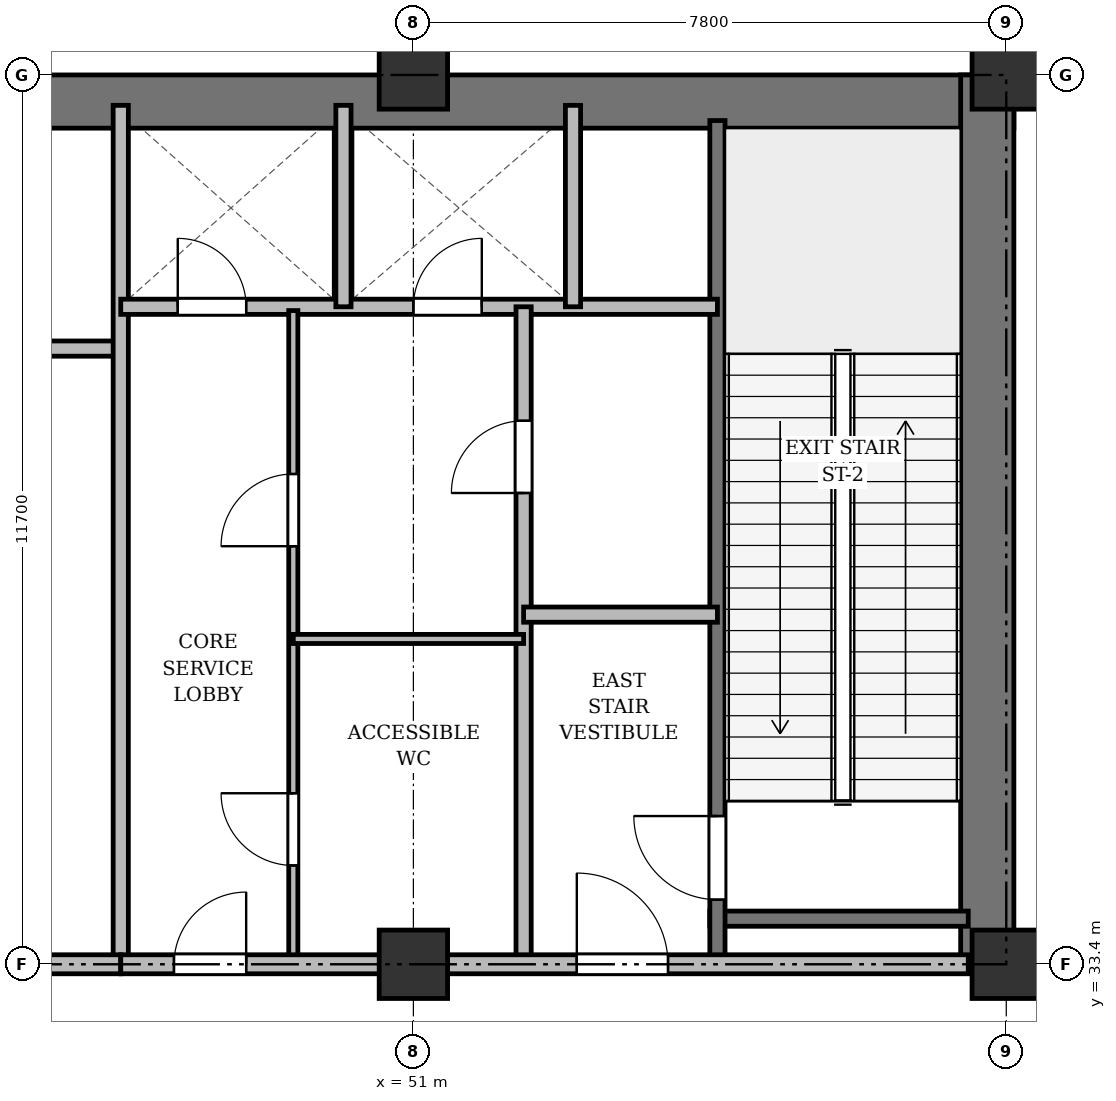
"""IFC4 building model, lengths in metres.
Left out: names, types, materials, properties, quantities, classifications, styles, units other than length and angle.
Written with IfcOpenShell. Run it as: python <this file> out.ifc"""

import sys

from ifc_helpers import new_model, si_unit, direction, frame, frame_2d, origin, origin_2d, place, context, subcontext, project, spatial, rectangle, extrude, source, transform, mapped, element, fill, save


model = new_model("IFC4")
c1 = context("Model", 3, precision=1e-05, world=origin(), true_north=direction((0.0, 1.0)))
c2 = subcontext(c1, "Body", "Model", "MODEL_VIEW")
j1 = project(units=[si_unit("LENGTHUNIT", "METRE"), si_unit("PLANEANGLEUNIT", "RADIAN")], contexts=[c1])
p1 = place(None, origin())
s1 = spatial("IfcSite", under=j1, at=p1, CompositionType="ELEMENT")
p2 = place(p1, origin())
s2 = spatial("IfcBuilding", under=s1, at=p2, CompositionType="ELEMENT")
p3 = place(p2, frame((0.0, 0.0, 73.9)))
s3 = spatial("IfcBuildingStorey", under=s2, at=p3, CompositionType="ELEMENT", Elevation=73.9)
m1 = source(origin(), c2, "Body", "SweptSolid", [
    extrude(rectangle(XDim=0.9, YDim=0.9, at=origin_2d()), origin(), (0.0, 0.0, 1.0), 7.8),
])
for number, where, z_axis, x_axis in (
    (1, (51.0, 33.4, 0.0), (0.0, 0.0, 1.0), (1.0, 0.0, 0.0)),
    (2, (51.0, 45.1, 0.0), (0.0, 0.0, 1.0), (1.0, 0.0, 0.0)),
    (3, (58.8, 33.4, 0.0), (0.0, 0.0, 1.0), (1.0, 0.0, 0.0)),
    (4, (58.8, 45.1, 0.0), (0.0, 0.0, 1.0), (1.0, 0.0, 0.0)),
):
    element("IfcColumn", number, at=place(p3, frame(where, z_axis=z_axis, x_axis=x_axis)), inside=s3, PredefinedType="COLUMN", context=c2, shape_type="MappedRepresentation", body=[
        mapped(m1, transform((0.0, 0.0, 0.0), x_axis=(1.0, 0.0, 0.0), y_axis=(0.0, 1.0, 0.0), z_axis=(0.0, 0.0, 1.0), scale=1.0)),
    ])
p4 = place(p3, frame((15.5, 44.75, 0.0), z_axis=(0.0, 0.0, 1.0), x_axis=(1.0, 0.0, 0.0)))
e5 = element("IfcWall", 5, at=p4, inside=s3, PredefinedType="SHEAR", context=c2, shape_type="SweptSolid", body=[
    extrude(rectangle(XDim=43.4, YDim=0.7, at=frame_2d((21.7, 0.0))), origin(), (0.0, 0.0, 1.0), 7.42),
])
p5 = place(p3, frame((58.55, 33.4, 0.0), z_axis=(0.0, 0.0, 1.0), x_axis=(0.0, 1.0, 0.0)))
e6 = element("IfcWall", 6, at=p5, inside=s3, PredefinedType="SHEAR", context=c2, shape_type="SweptSolid", body=[
    extrude(rectangle(XDim=11.7, YDim=0.7, at=frame_2d((5.85, 0.0))), origin(), (0.0, 0.0, 1.0), 7.42),
])
p6 = place(p3, frame((54.9, 34.0, 0.0), z_axis=(0.0, 0.0, 1.0), x_axis=(1.0, 0.0, 0.0)))
e7 = element("IfcWall", 7, at=p6, inside=s3, PredefinedType="SHEAR", context=c2, shape_type="SweptSolid", body=[
    extrude(rectangle(XDim=3.4, YDim=0.2, at=frame_2d((1.7, 0.0))), origin(), (0.0, 0.0, 1.0), 7.42),
])
p7 = place(p3, frame((55.0, 33.4, 0.0), z_axis=(0.0, 0.0, 1.0), x_axis=(0.0, 1.0, 0.0)))
e8 = element("IfcWall", 8, at=p7, inside=s3, PredefinedType="SHEAR", context=c2, shape_type="SweptSolid", body=[
    extrude(rectangle(XDim=11.1, YDim=0.2, at=frame_2d((5.55, 0.0))), origin(), (0.0, 0.0, 1.0), 7.42),
])
p8 = place(p7, frame((0.85, 0.0, 0.0)))
e9 = element("IfcOpeningElement", 9, at=p8, cuts=e8, PredefinedType="OPENING", context=c2, shape_type="SweptSolid", body=[
    extrude(rectangle(XDim=1.1, YDim=2.15, at=frame_2d((0.55, 1.075))), frame((0.0, 0.11, 0.0), z_axis=(0.0, -1.0, 0.0), x_axis=(1.0, 0.0, 0.0)), (0.0, 0.0, 1.0), 0.22),
])
p9 = place(p3, frame((40.25, 41.5, 0.0), z_axis=(0.0, 0.0, 1.0), x_axis=(1.0, 0.0, 0.0)))
e10 = element("IfcWall", 10, at=p9, inside=s3, PredefinedType="SOLIDWALL", context=c2, shape_type="SweptSolid", body=[
    extrude(rectangle(XDim=6.9, YDim=0.2, at=frame_2d((3.45, 0.0))), origin(), (0.0, 0.0, 1.0), 6.832),
])
p10 = place(p3, frame((47.15, 33.4, 0.0), z_axis=(0.0, 0.0, 1.0), x_axis=(0.0, 1.0, 0.0)))
e11 = element("IfcWall", 11, at=p10, inside=s3, PredefinedType="SOLIDWALL", context=c2, shape_type="SweptSolid", body=[
    extrude(rectangle(XDim=11.3, YDim=0.2, at=frame_2d((5.65, 0.0))), origin(), (0.0, 0.0, 1.0), 6.77),
])
p11 = place(p3, frame((26.3, 33.4, 0.0), z_axis=(0.0, 0.0, 1.0), x_axis=(1.0, 0.0, 0.0)))
e12 = element("IfcWall", 12, at=p11, inside=s3, PredefinedType="PARTITIONING", context=c2, shape_type="SweptSolid", body=[
    extrude(rectangle(XDim=20.85, YDim=0.25, at=frame_2d((10.425, 0.0))), origin(), (0.0, 0.0, 1.0), 6.77),
])
p12 = place(p11, frame((9.2, 0.0, 0.0)))
e13 = element("IfcOpeningElement", 13, at=p12, cuts=e12, PredefinedType="OPENING", context=c2, shape_type="SweptSolid", body=[
    extrude(rectangle(XDim=1.6, YDim=2.2, at=frame_2d((0.8, 1.1))), frame((0.0, 0.135, 0.0), z_axis=(0.0, -1.0, 0.0), x_axis=(1.0, 0.0, 0.0)), (0.0, 0.0, 1.0), 0.27),
])
p13 = place(p3, frame((47.15, 42.05, 0.0), z_axis=(0.0, 0.0, 1.0), x_axis=(1.0, 0.0, 0.0)))
e14 = element("IfcWall", 14, at=p13, inside=s3, PredefinedType="SOLIDWALL", context=c2, shape_type="SweptSolid", body=[
    extrude(rectangle(XDim=7.85, YDim=0.2, at=frame_2d((3.925, 0.0))), origin(), (0.0, 0.0, 1.0), 6.832),
])
p14 = place(p13, frame((0.75, 0.0, 0.0)))
e15 = element("IfcOpeningElement", 15, at=p14, cuts=e14, PredefinedType="OPENING", context=c2, shape_type="SweptSolid", body=[
    extrude(rectangle(XDim=0.9, YDim=2.1, at=frame_2d((0.45, 1.05))), frame((0.0, 0.11, 0.0), z_axis=(0.0, -1.0, 0.0), x_axis=(1.0, 0.0, 0.0)), (0.0, 0.0, 1.0), 0.22),
])
p15 = place(p13, frame((3.85, 0.0, 0.0)))
e16 = element("IfcOpeningElement", 16, at=p15, cuts=e14, PredefinedType="OPENING", context=c2, shape_type="SweptSolid", body=[
    extrude(rectangle(XDim=0.9, YDim=2.1, at=frame_2d((0.45, 1.05))), frame((0.0, 0.11, 0.0), z_axis=(0.0, -1.0, 0.0), x_axis=(1.0, 0.0, 0.0)), (0.0, 0.0, 1.0), 0.22),
])
for number, where, z_axis, x_axis in (
    (17, (50.08, 42.05, 0.0), (0.0, 0.0, 1.0), (0.0, 1.0, 0.0)),
    (18, (53.1, 42.05, 0.0), (0.0, 0.0, 1.0), (0.0, 1.0, 0.0)),
):
    element("IfcWall", number, at=place(p3, frame(where, z_axis=z_axis, x_axis=x_axis)), inside=s3, PredefinedType="SOLIDWALL", context=c2, shape_type="SweptSolid", body=[
        extrude(rectangle(XDim=2.65, YDim=0.2, at=frame_2d((1.325, 0.0))), origin(), (0.0, 0.0, 1.0), 7.42),
    ])
p16 = place(p3, frame((52.45, 33.4, 0.0), z_axis=(0.0, 0.0, 1.0), x_axis=(0.0, 1.0, 0.0)))
e19 = element("IfcWall", 19, at=p16, inside=s3, PredefinedType="PARTITIONING", context=c2, shape_type="SweptSolid", body=[
    extrude(rectangle(XDim=8.65, YDim=0.2, at=frame_2d((4.325, 0.0))), origin(), (0.0, 0.0, 1.0), 6.77),
])
p17 = place(p16, frame((6.2, 0.0, 0.0)))
e20 = element("IfcOpeningElement", 20, at=p17, cuts=e19, PredefinedType="OPENING", context=c2, shape_type="SweptSolid", body=[
    extrude(rectangle(XDim=0.95, YDim=2.15, at=frame_2d((0.475, 1.075))), frame((0.0, 0.11, 0.0), z_axis=(0.0, -1.0, 0.0), x_axis=(1.0, 0.0, 0.0)), (0.0, 0.0, 1.0), 0.22),
])
p18 = place(p3, frame((52.45, 38.0, 0.0), z_axis=(0.0, 0.0, 1.0), x_axis=(1.0, 0.0, 0.0)))
e21 = element("IfcWall", 21, at=p18, inside=s3, PredefinedType="PARTITIONING", context=c2, shape_type="SweptSolid", body=[
    extrude(rectangle(XDim=2.55, YDim=0.2, at=frame_2d((1.275, 0.0))), origin(), (0.0, 0.0, 1.0), 7.42),
])
p19 = place(p3, frame((49.42, 33.4, 0.0), z_axis=(0.0, 0.0, 1.0), x_axis=(0.0, 1.0, 0.0)))
e22 = element("IfcWall", 22, at=p19, inside=s3, PredefinedType="PARTITIONING", context=c2, shape_type="SweptSolid", body=[
    extrude(rectangle(XDim=8.6, YDim=0.12, at=frame_2d((4.3, 0.0))), origin(), (0.0, 0.0, 1.0), 6.77),
])
p20 = place(p19, frame((1.3, 0.0, 0.0)))
e23 = element("IfcOpeningElement", 23, at=p20, cuts=e22, PredefinedType="OPENING", context=c2, shape_type="SweptSolid", body=[
    extrude(rectangle(XDim=0.95, YDim=2.15, at=frame_2d((0.475, 1.075))), frame((0.0, 0.07, 0.0), z_axis=(0.0, -1.0, 0.0), x_axis=(1.0, 0.0, 0.0)), (0.0, 0.0, 1.0), 0.14),
])
p21 = place(p19, frame((5.5, 0.0, 0.0)))
e24 = element("IfcOpeningElement", 24, at=p21, cuts=e22, PredefinedType="OPENING", context=c2, shape_type="SweptSolid", body=[
    extrude(rectangle(XDim=0.95, YDim=2.15, at=frame_2d((0.475, 1.075))), frame((0.0, 0.07, 0.0), z_axis=(0.0, -1.0, 0.0), x_axis=(1.0, 0.0, 0.0)), (0.0, 0.0, 1.0), 0.14),
])
p22 = place(p3, frame((49.42, 37.68, 0.0), z_axis=(0.0, 0.0, 1.0), x_axis=(1.0, 0.0, 0.0)))
e25 = element("IfcWall", 25, at=p22, inside=s3, PredefinedType="PARTITIONING", context=c2, shape_type="SweptSolid", body=[
    extrude(rectangle(XDim=3.03, YDim=0.12, at=frame_2d((1.515, 0.0))), origin(), (0.0, 0.0, 1.0), 6.832),
])
p23 = place(p3, frame((47.15, 33.4, 0.0), z_axis=(0.0, 0.0, 1.0), x_axis=(1.0, 0.0, 0.0)))
e26 = element("IfcWall", 26, at=p23, inside=s3, PredefinedType="PARTITIONING", context=c2, shape_type="SweptSolid", body=[
    extrude(rectangle(XDim=11.15, YDim=0.25, at=frame_2d((5.575, 0.0))), origin(), (0.0, 0.0, 1.0), 6.77),
])
p24 = place(p23, frame((0.7, 0.0, 0.0)))
e27 = element("IfcOpeningElement", 27, at=p24, cuts=e26, PredefinedType="OPENING", context=c2, shape_type="SweptSolid", body=[
    extrude(rectangle(XDim=0.95, YDim=2.15, at=frame_2d((0.475, 1.075))), frame((0.0, 0.135, 0.0), z_axis=(0.0, -1.0, 0.0), x_axis=(1.0, 0.0, 0.0)), (0.0, 0.0, 1.0), 0.27),
])
p25 = place(p23, frame((6.0, 0.0, 0.0)))
e28 = element("IfcOpeningElement", 28, at=p25, cuts=e26, PredefinedType="OPENING", context=c2, shape_type="SweptSolid", body=[
    extrude(rectangle(XDim=1.2, YDim=2.15, at=frame_2d((0.6, 1.075))), frame((0.0, 0.135, 0.0), z_axis=(0.0, -1.0, 0.0), x_axis=(1.0, 0.0, 0.0)), (0.0, 0.0, 1.0), 0.27),
])
m2 = source(origin(), c2, "Body", "SweptSolid", [
    extrude(rectangle(XDim=1.1, YDim=2.15, at=frame_2d((0.55, 1.075))), frame((0.0, 0.025, 0.0), z_axis=(0.0, -1.0, 0.0), x_axis=(1.0, 0.0, 0.0)), (0.0, 0.0, 1.0), 0.05),
])
p26 = place(p8, origin())
e29 = element("IfcDoor", 29, at=p26, inside=s3, OperationType="SINGLE_SWING_RIGHT", PredefinedType="DOOR", context=c2, shape_type="MappedRepresentation", body=[
    mapped(m2, transform((0.0, 0.0, 0.0), x_axis=(1.0, 0.0, 0.0), y_axis=(0.0, 1.0, 0.0), z_axis=(0.0, 0.0, 1.0), scale=1.0)),
])
fill(e9, e29)
m3 = source(origin(), c2, "Body", "SweptSolid", [
    extrude(rectangle(XDim=0.9, YDim=2.1, at=frame_2d((0.45, 1.05))), frame((0.0, 0.025, 0.0), z_axis=(0.0, -1.0, 0.0), x_axis=(1.0, 0.0, 0.0)), (0.0, 0.0, 1.0), 0.05),
])
p27 = place(p14, origin())
e30 = element("IfcDoor", 30, at=p27, inside=s3, OperationType="SINGLE_SWING_LEFT", PredefinedType="DOOR", context=c2, shape_type="MappedRepresentation", body=[
    mapped(m3, transform((0.0, 0.0, 0.0), x_axis=(1.0, 0.0, 0.0), y_axis=(0.0, 1.0, 0.0), z_axis=(0.0, 0.0, 1.0), scale=1.0)),
])
fill(e15, e30)
p28 = place(p15, origin())
e31 = element("IfcDoor", 31, at=p28, inside=s3, OperationType="SINGLE_SWING_RIGHT", PredefinedType="DOOR", context=c2, shape_type="MappedRepresentation", body=[
    mapped(m3, transform((0.0, 0.0, 0.0), x_axis=(1.0, 0.0, 0.0), y_axis=(0.0, 1.0, 0.0), z_axis=(0.0, 0.0, 1.0), scale=1.0)),
])
fill(e16, e31)
m4 = source(origin(), c2, "Body", "SweptSolid", [
    extrude(rectangle(XDim=0.95, YDim=2.15, at=frame_2d((0.475, 1.075))), frame((0.0, 0.025, 0.0), z_axis=(0.0, -1.0, 0.0), x_axis=(1.0, 0.0, 0.0)), (0.0, 0.0, 1.0), 0.05),
])
p29 = place(p17, origin())
e32 = element("IfcDoor", 32, at=p29, inside=s3, OperationType="SINGLE_SWING_LEFT", PredefinedType="DOOR", context=c2, shape_type="MappedRepresentation", body=[
    mapped(m4, transform((0.0, 0.0, 0.0), x_axis=(1.0, 0.0, 0.0), y_axis=(0.0, 1.0, 0.0), z_axis=(0.0, 0.0, 1.0), scale=1.0)),
])
fill(e20, e32)
p30 = place(p20, origin())
e33 = element("IfcDoor", 33, at=p30, inside=s3, OperationType="SINGLE_SWING_RIGHT", PredefinedType="DOOR", context=c2, shape_type="MappedRepresentation", body=[
    mapped(m4, transform((0.0, 0.0, 0.0), x_axis=(1.0, 0.0, 0.0), y_axis=(0.0, 1.0, 0.0), z_axis=(0.0, 0.0, 1.0), scale=1.0)),
])
fill(e23, e33)
p31 = place(p21, origin())
e34 = element("IfcDoor", 34, at=p31, inside=s3, OperationType="SINGLE_SWING_LEFT", PredefinedType="DOOR", context=c2, shape_type="MappedRepresentation", body=[
    mapped(m4, transform((0.0, 0.0, 0.0), x_axis=(1.0, 0.0, 0.0), y_axis=(0.0, 1.0, 0.0), z_axis=(0.0, 0.0, 1.0), scale=1.0)),
])
fill(e24, e34)
p32 = place(p24, origin())
e35 = element("IfcDoor", 35, at=p32, inside=s3, OperationType="SINGLE_SWING_RIGHT", PredefinedType="DOOR", context=c2, shape_type="MappedRepresentation", body=[
    mapped(m4, transform((0.0, 0.0, 0.0), x_axis=(1.0, 0.0, 0.0), y_axis=(0.0, 1.0, 0.0), z_axis=(0.0, 0.0, 1.0), scale=1.0)),
])
fill(e27, e35)
m5 = source(origin(), c2, "Body", "SweptSolid", [
    extrude(rectangle(XDim=1.2, YDim=2.15, at=frame_2d((0.6, 1.075))), frame((0.0, 0.025, 0.0), z_axis=(0.0, -1.0, 0.0), x_axis=(1.0, 0.0, 0.0)), (0.0, 0.0, 1.0), 0.05),
])
p33 = place(p25, origin())
e36 = element("IfcDoor", 36, at=p33, inside=s3, OperationType="SINGLE_SWING_LEFT", PredefinedType="DOOR", context=c2, shape_type="MappedRepresentation", body=[
    mapped(m5, transform((0.0, 0.0, 0.0), x_axis=(1.0, 0.0, 0.0), y_axis=(0.0, 1.0, 0.0), z_axis=(0.0, 0.0, 1.0), scale=1.0)),
])
fill(e28, e36)
save(model, sys.argv[1])
